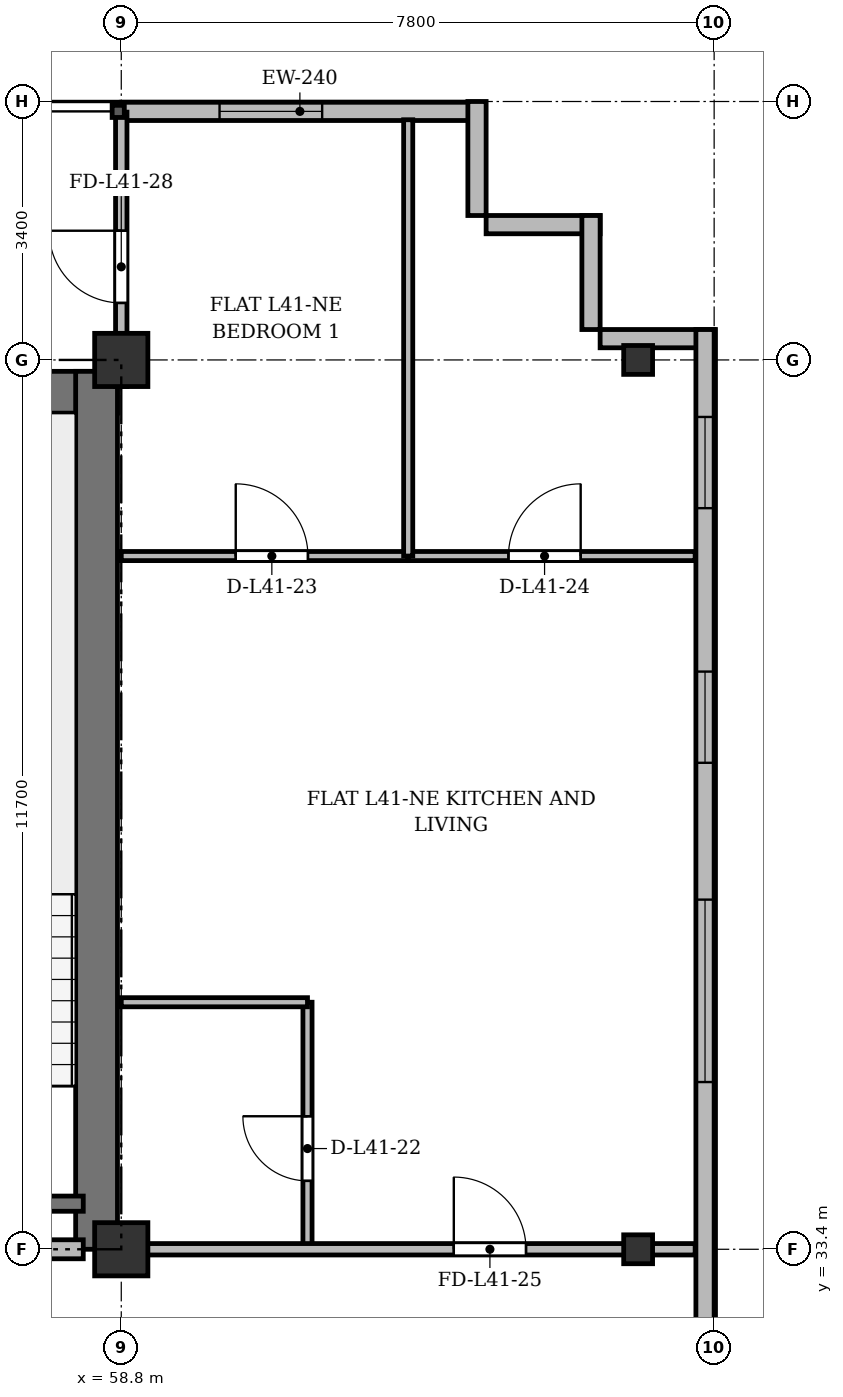
"""IFC4 building model, lengths in metres.
Left out: names, types, materials, properties, quantities, classifications, styles, units other than length and angle.
Written with IfcOpenShell. Run it as: python <this file> out.ifc"""

import sys

from ifc_helpers import new_model, si_unit, direction, frame, frame_2d, origin, origin_2d, place, context, subcontext, project, spatial, rectangle, i_section, extrude, source, transform, mapped, element, fill, save


model = new_model("IFC4")
c1 = context("Model", 3, precision=1e-05, world=origin(), true_north=direction((0.0, 1.0)))
c2 = subcontext(c1, "Body", "Model", "MODEL_VIEW")
j1 = project(units=[si_unit("LENGTHUNIT", "METRE"), si_unit("PLANEANGLEUNIT", "RADIAN")], contexts=[c1])
p1 = place(None, origin())
s1 = spatial("IfcSite", under=j1, at=p1, CompositionType="ELEMENT")
p2 = place(p1, origin())
s2 = spatial("IfcBuilding", under=s1, at=p2, CompositionType="ELEMENT")
p3 = place(p2, frame((0.0, 0.0, 157.3)))
s3 = spatial("IfcBuildingStorey", under=s2, at=p3, CompositionType="ELEMENT", Elevation=157.3)
m1 = source(origin(), c2, "Body", "SweptSolid", [
    extrude(rectangle(XDim=0.7, YDim=0.7, at=origin_2d()), origin(), (0.0, 0.0, 1.0), 3.6),
])
for number, where, z_axis, x_axis in (
    (1, (58.8, 33.4, 0.0), (0.0, 0.0, 1.0), (1.0, 0.0, 0.0)),
    (2, (58.8, 45.1, 0.0), (0.0, 0.0, 1.0), (1.0, 0.0, 0.0)),
):
    element("IfcColumn", number, at=place(p3, frame(where, z_axis=z_axis, x_axis=x_axis)), inside=s3, PredefinedType="COLUMN", context=c2, shape_type="MappedRepresentation", body=[
        mapped(m1, transform((0.0, 0.0, 0.0), x_axis=(1.0, 0.0, 0.0), y_axis=(0.0, 1.0, 0.0), z_axis=(0.0, 0.0, 1.0), scale=1.0)),
    ])
m2 = source(origin(), c2, "Body", "SweptSolid", [
    extrude(i_section(OverallWidth=0.38, OverallDepth=0.38, WebThickness=0.02, FlangeThickness=0.03, at=origin_2d()), origin(), (0.0, 0.0, 1.0), 3.6),
])
for number, where, z_axis, x_axis in (
    (3, (65.6, 33.4, 0.0), (0.0, 0.0, 1.0), (1.0, 0.0, 0.0)),
    (4, (65.6, 45.1, 0.0), (0.0, 0.0, 1.0), (1.0, 0.0, 0.0)),
):
    element("IfcColumn", number, at=place(p3, frame(where, z_axis=z_axis, x_axis=x_axis)), inside=s3, PredefinedType="COLUMN", context=c2, shape_type="MappedRepresentation", body=[
        mapped(m2, transform((0.0, 0.0, 0.0), x_axis=(1.0, 0.0, 0.0), y_axis=(0.0, 1.0, 0.0), z_axis=(0.0, 0.0, 1.0), scale=1.0)),
    ])
p4 = place(p3, frame((58.8, 48.37, 0.0), z_axis=(0.0, 0.0, 1.0), x_axis=(1.0, 0.0, 0.0)))
e5 = element("IfcWall", 5, at=p4, inside=s3, PredefinedType="SOLIDWALL", context=c2, shape_type="SweptSolid", body=[
    extrude(rectangle(XDim=4.7, YDim=0.24, at=frame_2d((2.35, 0.0))), origin(), (0.0, 0.0, 1.0), 3.35),
])
p5 = place(p4, frame((1.293, 0.0, 0.9)))
e6 = element("IfcOpeningElement", 6, at=p5, cuts=e5, PredefinedType="OPENING", context=c2, shape_type="SweptSolid", body=[
    extrude(rectangle(XDim=1.35, YDim=1.5, at=frame_2d((0.675, 0.75))), frame((0.0, 0.13, 0.0), z_axis=(0.0, -1.0, 0.0), x_axis=(1.0, 0.0, 0.0)), (0.0, 0.0, 1.0), 0.26),
])
for number, where, z_axis, x_axis in (
    (7, (63.48, 48.5, 0.0), (0.0, 0.0, 1.0), (0.0, -1.0, 0.0)),
    (8, (63.6, 46.88, 0.0), (0.0, 0.0, 1.0), (1.0, 0.0, 0.0)),
    (9, (64.98, 47.0, 0.0), (0.0, 0.0, 1.0), (0.0, -1.0, 0.0)),
    (10, (65.1, 45.38, 0.0), (0.0, 0.0, 1.0), (1.0, 0.0, 0.0)),
):
    element("IfcWall", number, at=place(p3, frame(where, z_axis=z_axis, x_axis=x_axis)), inside=s3, PredefinedType="SOLIDWALL", context=c2, shape_type="SweptSolid", body=[
        extrude(rectangle(XDim=1.5, YDim=0.24, at=frame_2d((0.75, 0.0))), origin(), (0.0, 0.0, 1.0), 3.35),
    ])
p6 = place(p3, frame((66.48, 45.5, 0.0), z_axis=(0.0, 0.0, 1.0), x_axis=(0.0, -1.0, 0.0)))
e11 = element("IfcWall", 11, at=p6, inside=s3, PredefinedType="SOLIDWALL", context=c2, shape_type="SweptSolid", body=[
    extrude(rectangle(XDim=39.2, YDim=0.24, at=frame_2d((19.6, 0.0))), origin(), (0.0, 0.0, 1.0), 3.35),
])
p7 = place(p6, frame((36.55, 0.0, 0.92)))
e12 = element("IfcOpeningElement", 12, at=p7, cuts=e11, PredefinedType="OPENING", context=c2, shape_type="SweptSolid", body=[
    extrude(rectangle(XDim=1.2, YDim=1.65, at=frame_2d((0.6, 0.825))), frame((0.0, 0.13, 0.0), z_axis=(0.0, -1.0, 0.0), x_axis=(1.0, 0.0, 0.0)), (0.0, 0.0, 1.0), 0.26),
])
p8 = place(p6, frame((32.9, 0.0, 0.92)))
e13 = element("IfcOpeningElement", 13, at=p8, cuts=e11, PredefinedType="OPENING", context=c2, shape_type="SweptSolid", body=[
    extrude(rectangle(XDim=2.4, YDim=2.1, at=frame_2d((1.2, 1.05))), frame((0.0, 0.13, 0.0), z_axis=(0.0, -1.0, 0.0), x_axis=(1.0, 0.0, 0.0)), (0.0, 0.0, 1.0), 0.26),
])
p9 = place(p6, frame((28.7, 0.0, 0.92)))
e14 = element("IfcOpeningElement", 14, at=p9, cuts=e11, PredefinedType="OPENING", context=c2, shape_type="SweptSolid", body=[
    extrude(rectangle(XDim=2.4, YDim=2.1, at=frame_2d((1.2, 1.05))), frame((0.0, 0.13, 0.0), z_axis=(0.0, -1.0, 0.0), x_axis=(1.0, 0.0, 0.0)), (0.0, 0.0, 1.0), 0.26),
])
p10 = place(p6, frame((21.5, 0.0, 0.92)))
e15 = element("IfcOpeningElement", 15, at=p10, cuts=e11, PredefinedType="OPENING", context=c2, shape_type="SweptSolid", body=[
    extrude(rectangle(XDim=2.4, YDim=2.1, at=frame_2d((1.2, 1.05))), frame((0.0, 0.13, 0.0), z_axis=(0.0, -1.0, 0.0), x_axis=(1.0, 0.0, 0.0)), (0.0, 0.0, 1.0), 0.26),
])
p11 = place(p6, frame((7.5, 0.0, 0.92)))
e16 = element("IfcOpeningElement", 16, at=p11, cuts=e11, PredefinedType="OPENING", context=c2, shape_type="SweptSolid", body=[
    extrude(rectangle(XDim=2.4, YDim=2.1, at=frame_2d((1.2, 1.05))), frame((0.0, 0.13, 0.0), z_axis=(0.0, -1.0, 0.0), x_axis=(1.0, 0.0, 0.0)), (0.0, 0.0, 1.0), 0.26),
])
p12 = place(p6, frame((4.5, 0.0, 0.92)))
e17 = element("IfcOpeningElement", 17, at=p12, cuts=e11, PredefinedType="OPENING", context=c2, shape_type="SweptSolid", body=[
    extrude(rectangle(XDim=1.2, YDim=1.65, at=frame_2d((0.6, 0.825))), frame((0.0, 0.13, 0.0), z_axis=(0.0, -1.0, 0.0), x_axis=(1.0, 0.0, 0.0)), (0.0, 0.0, 1.0), 0.26),
])
p13 = place(p6, frame((1.15, 0.0, 0.92)))
e18 = element("IfcOpeningElement", 18, at=p13, cuts=e11, PredefinedType="OPENING", context=c2, shape_type="SweptSolid", body=[
    extrude(rectangle(XDim=1.2, YDim=1.65, at=frame_2d((0.6, 0.825))), frame((0.0, 0.13, 0.0), z_axis=(0.0, -1.0, 0.0), x_axis=(1.0, 0.0, 0.0)), (0.0, 0.0, 1.0), 0.26),
])
p14 = place(p3, frame((15.65, 44.675, 0.0), z_axis=(0.0, 0.0, 1.0), x_axis=(1.0, 0.0, 0.0)))
e19 = element("IfcWall", 19, at=p14, inside=s3, PredefinedType="SHEAR", context=c2, shape_type="SweptSolid", body=[
    extrude(rectangle(XDim=43.1, YDim=0.55, at=frame_2d((21.55, 0.0))), origin(), (0.0, 0.0, 1.0), 3.35),
])
p15 = place(p3, frame((58.475, 33.4, 0.0), z_axis=(0.0, 0.0, 1.0), x_axis=(0.0, 1.0, 0.0)))
e20 = element("IfcWall", 20, at=p15, inside=s3, PredefinedType="SHEAR", context=c2, shape_type="SweptSolid", body=[
    extrude(rectangle(XDim=11.55, YDim=0.55, at=frame_2d((5.775, 0.0))), origin(), (0.0, 0.0, 1.0), 3.35),
])
p16 = place(p3, frame((54.9, 34.0, 0.0), z_axis=(0.0, 0.0, 1.0), x_axis=(1.0, 0.0, 0.0)))
e21 = element("IfcWall", 21, at=p16, inside=s3, PredefinedType="SHEAR", context=c2, shape_type="SweptSolid", body=[
    extrude(rectangle(XDim=3.4, YDim=0.2, at=frame_2d((1.7, 0.0))), origin(), (0.0, 0.0, 1.0), 3.35),
])
p17 = place(p3, frame((47.15, 33.4, 0.0), z_axis=(0.0, 0.0, 1.0), x_axis=(1.0, 0.0, 0.0)))
e22 = element("IfcWall", 22, at=p17, inside=s3, PredefinedType="PARTITIONING", context=c2, shape_type="SweptSolid", body=[
    extrude(rectangle(XDim=11.15, YDim=0.25, at=frame_2d((5.575, 0.0))), origin(), (0.0, 0.0, 1.0), 2.75),
])
p18 = place(p17, frame((0.7, 0.0, 0.0)))
e23 = element("IfcOpeningElement", 23, at=p18, cuts=e22, PredefinedType="OPENING", context=c2, shape_type="SweptSolid", body=[
    extrude(rectangle(XDim=0.95, YDim=2.15, at=frame_2d((0.475, 1.075))), frame((0.0, 0.135, 0.0), z_axis=(0.0, -1.0, 0.0), x_axis=(1.0, 0.0, 0.0)), (0.0, 0.0, 1.0), 0.27),
])
p19 = place(p17, frame((6.0, 0.0, 0.0)))
e24 = element("IfcOpeningElement", 24, at=p19, cuts=e22, PredefinedType="OPENING", context=c2, shape_type="SweptSolid", body=[
    extrude(rectangle(XDim=1.2, YDim=2.15, at=frame_2d((0.6, 1.075))), frame((0.0, 0.135, 0.0), z_axis=(0.0, -1.0, 0.0), x_axis=(1.0, 0.0, 0.0)), (0.0, 0.0, 1.0), 0.27),
])
p20 = place(p3, frame((61.25, 33.4, 0.0), z_axis=(0.0, 0.0, 1.0), x_axis=(0.0, 1.0, 0.0)))
e25 = element("IfcWall", 25, at=p20, inside=s3, PredefinedType="PARTITIONING", context=c2, shape_type="SweptSolid", body=[
    extrude(rectangle(XDim=3.25, YDim=0.12, at=frame_2d((1.625, 0.0))), origin(), (0.0, 0.0, 1.0), 2.75),
])
p21 = place(p20, frame((0.9, 0.0, 0.0)))
e26 = element("IfcOpeningElement", 26, at=p21, cuts=e25, PredefinedType="OPENING", context=c2, shape_type="SweptSolid", body=[
    extrude(rectangle(XDim=0.85, YDim=2.1, at=frame_2d((0.425, 1.05))), frame((0.0, 0.07, 0.0), z_axis=(0.0, -1.0, 0.0), x_axis=(1.0, 0.0, 0.0)), (0.0, 0.0, 1.0), 0.14),
])
p22 = place(p3, frame((58.8, 36.65, 0.0), z_axis=(0.0, 0.0, 1.0), x_axis=(1.0, 0.0, 0.0)))
e27 = element("IfcWall", 27, at=p22, inside=s3, PredefinedType="PARTITIONING", context=c2, shape_type="SweptSolid", body=[
    extrude(rectangle(XDim=2.45, YDim=0.12, at=frame_2d((1.225, 0.0))), origin(), (0.0, 0.0, 1.0), 2.85),
])
p23 = place(p3, frame((58.8, 42.52, 0.0), z_axis=(0.0, 0.0, 1.0), x_axis=(1.0, 0.0, 0.0)))
e28 = element("IfcWall", 28, at=p23, inside=s3, PredefinedType="PARTITIONING", context=c2, shape_type="SweptSolid", body=[
    extrude(rectangle(XDim=3.775, YDim=0.12, at=frame_2d((1.887, 0.0))), origin(), (0.0, 0.0, 1.0), 2.85),
])
p24 = place(p23, frame((1.506, 0.0, 0.0)))
e29 = element("IfcOpeningElement", 29, at=p24, cuts=e28, PredefinedType="OPENING", context=c2, shape_type="SweptSolid", body=[
    extrude(rectangle(XDim=0.95, YDim=2.15, at=frame_2d((0.475, 1.075))), frame((0.0, 0.07, 0.0), z_axis=(0.0, -1.0, 0.0), x_axis=(1.0, 0.0, 0.0)), (0.0, 0.0, 1.0), 0.14),
])
p25 = place(p3, frame((62.575, 42.52, 0.0), z_axis=(0.0, 0.0, 1.0), x_axis=(1.0, 0.0, 0.0)))
e30 = element("IfcWall", 30, at=p25, inside=s3, PredefinedType="PARTITIONING", context=c2, shape_type="SweptSolid", body=[
    extrude(rectangle(XDim=3.775, YDim=0.12, at=frame_2d((1.888, 0.0))), origin(), (0.0, 0.0, 1.0), 2.85),
])
p26 = place(p25, frame((1.319, 0.0, 0.0)))
e31 = element("IfcOpeningElement", 31, at=p26, cuts=e30, PredefinedType="OPENING", context=c2, shape_type="SweptSolid", body=[
    extrude(rectangle(XDim=0.95, YDim=2.15, at=frame_2d((0.475, 1.075))), frame((0.0, 0.07, 0.0), z_axis=(0.0, -1.0, 0.0), x_axis=(1.0, 0.0, 0.0)), (0.0, 0.0, 1.0), 0.14),
])
p27 = place(p3, frame((62.575, 42.52, 0.0), z_axis=(0.0, 0.0, 1.0), x_axis=(0.0, 1.0, 0.0)))
e32 = element("IfcWall", 32, at=p27, inside=s3, PredefinedType="PARTITIONING", context=c2, shape_type="SweptSolid", body=[
    extrude(rectangle(XDim=5.74, YDim=0.12, at=frame_2d((2.87, 0.0))), origin(), (0.0, 0.0, 1.0), 2.75),
])
p28 = place(p3, frame((58.8, 33.4, 0.0), z_axis=(0.0, 0.0, 1.0), x_axis=(1.0, 0.0, 0.0)))
e33 = element("IfcWall", 33, at=p28, inside=s3, PredefinedType="PARTITIONING", context=c2, shape_type="SweptSolid", body=[
    extrude(rectangle(XDim=7.55, YDim=0.15, at=frame_2d((3.775, 0.0))), origin(), (0.0, 0.0, 1.0), 2.75),
])
p29 = place(p28, frame((4.375, 0.0, 0.0)))
e34 = element("IfcOpeningElement", 34, at=p29, cuts=e33, PredefinedType="OPENING", context=c2, shape_type="SweptSolid", body=[
    extrude(rectangle(XDim=0.95, YDim=2.15, at=frame_2d((0.475, 1.075))), frame((0.0, 0.085, 0.0), z_axis=(0.0, -1.0, 0.0), x_axis=(1.0, 0.0, 0.0)), (0.0, 0.0, 1.0), 0.17),
])
p30 = place(p3, frame((58.8, 44.75, 0.0), z_axis=(0.0, 0.0, 1.0), x_axis=(0.0, 1.0, 0.0)))
e35 = element("IfcWall", 35, at=p30, inside=s3, PredefinedType="PARTITIONING", context=c2, shape_type="SweptSolid", body=[
    extrude(rectangle(XDim=3.61, YDim=0.15, at=frame_2d((1.805, 0.0))), origin(), (0.0, 0.0, 1.0), 2.85),
])
p31 = place(p30, frame((1.1, 0.0, 0.0)))
e36 = element("IfcOpeningElement", 36, at=p31, cuts=e35, PredefinedType="OPENING", context=c2, shape_type="SweptSolid", body=[
    extrude(rectangle(XDim=0.95, YDim=2.15, at=frame_2d((0.475, 1.075))), frame((0.0, 0.085, 0.0), z_axis=(0.0, -1.0, 0.0), x_axis=(1.0, 0.0, 0.0)), (0.0, 0.0, 1.0), 0.17),
])
m3 = source(origin(), c2, "Body", "SweptSolid", [
    extrude(rectangle(XDim=1.35, YDim=1.5, at=frame_2d((0.675, 0.75))), frame((0.0, 0.03, 0.0), z_axis=(0.0, -1.0, 0.0), x_axis=(1.0, 0.0, 0.0)), (0.0, 0.0, 1.0), 0.06),
])
p32 = place(p5, origin())
e37 = element("IfcWindow", 37, at=p32, inside=s3, PartitioningType="SINGLE_PANEL", PredefinedType="WINDOW", context=c2, shape_type="MappedRepresentation", body=[
    mapped(m3, transform((0.0, 0.0, 0.0), x_axis=(1.0, 0.0, 0.0), y_axis=(0.0, 1.0, 0.0), z_axis=(0.0, 0.0, 1.0), scale=1.0)),
])
fill(e6, e37)
m4 = source(origin(), c2, "Body", "SweptSolid", [
    extrude(rectangle(XDim=2.4, YDim=2.1, at=frame_2d((1.2, 1.05))), frame((0.0, 0.03, 0.0), z_axis=(0.0, -1.0, 0.0), x_axis=(1.0, 0.0, 0.0)), (0.0, 0.0, 1.0), 0.06),
])
p33 = place(p11, origin())
e38 = element("IfcWindow", 38, at=p33, inside=s3, PartitioningType="SINGLE_PANEL", PredefinedType="WINDOW", context=c2, shape_type="MappedRepresentation", body=[
    mapped(m4, transform((0.0, 0.0, 0.0), x_axis=(1.0, 0.0, 0.0), y_axis=(0.0, 1.0, 0.0), z_axis=(0.0, 0.0, 1.0), scale=1.0)),
])
fill(e16, e38)
m5 = source(origin(), c2, "Body", "SweptSolid", [
    extrude(rectangle(XDim=1.2, YDim=1.65, at=frame_2d((0.6, 0.825))), frame((0.0, 0.03, 0.0), z_axis=(0.0, -1.0, 0.0), x_axis=(1.0, 0.0, 0.0)), (0.0, 0.0, 1.0), 0.06),
])
p34 = place(p12, origin())
e39 = element("IfcWindow", 39, at=p34, inside=s3, PartitioningType="SINGLE_PANEL", PredefinedType="WINDOW", context=c2, shape_type="MappedRepresentation", body=[
    mapped(m5, transform((0.0, 0.0, 0.0), x_axis=(1.0, 0.0, 0.0), y_axis=(0.0, 1.0, 0.0), z_axis=(0.0, 0.0, 1.0), scale=1.0)),
])
fill(e17, e39)
p35 = place(p13, origin())
e40 = element("IfcWindow", 40, at=p35, inside=s3, PartitioningType="SINGLE_PANEL", PredefinedType="WINDOW", context=c2, shape_type="MappedRepresentation", body=[
    mapped(m5, transform((0.0, 0.0, 0.0), x_axis=(1.0, 0.0, 0.0), y_axis=(0.0, 1.0, 0.0), z_axis=(0.0, 0.0, 1.0), scale=1.0)),
])
fill(e18, e40)
m6 = source(origin(), c2, "Body", "SweptSolid", [
    extrude(rectangle(XDim=0.85, YDim=2.1, at=frame_2d((0.425, 1.05))), frame((0.0, 0.025, 0.0), z_axis=(0.0, -1.0, 0.0), x_axis=(1.0, 0.0, 0.0)), (0.0, 0.0, 1.0), 0.05),
])
p36 = place(p21, origin())
e41 = element("IfcDoor", 41, at=p36, inside=s3, OperationType="SINGLE_SWING_RIGHT", PredefinedType="DOOR", context=c2, shape_type="MappedRepresentation", body=[
    mapped(m6, transform((0.0, 0.0, 0.0), x_axis=(1.0, 0.0, 0.0), y_axis=(0.0, 1.0, 0.0), z_axis=(0.0, 0.0, 1.0), scale=1.0)),
])
fill(e26, e41)
m7 = source(origin(), c2, "Body", "SweptSolid", [
    extrude(rectangle(XDim=0.95, YDim=2.15, at=frame_2d((0.475, 1.075))), frame((0.0, 0.025, 0.0), z_axis=(0.0, -1.0, 0.0), x_axis=(1.0, 0.0, 0.0)), (0.0, 0.0, 1.0), 0.05),
])
p37 = place(p24, origin())
e42 = element("IfcDoor", 42, at=p37, inside=s3, OperationType="SINGLE_SWING_LEFT", PredefinedType="DOOR", context=c2, shape_type="MappedRepresentation", body=[
    mapped(m7, transform((0.0, 0.0, 0.0), x_axis=(1.0, 0.0, 0.0), y_axis=(0.0, 1.0, 0.0), z_axis=(0.0, 0.0, 1.0), scale=1.0)),
])
fill(e29, e42)
p38 = place(p26, origin())
e43 = element("IfcDoor", 43, at=p38, inside=s3, OperationType="SINGLE_SWING_RIGHT", PredefinedType="DOOR", context=c2, shape_type="MappedRepresentation", body=[
    mapped(m7, transform((0.0, 0.0, 0.0), x_axis=(1.0, 0.0, 0.0), y_axis=(0.0, 1.0, 0.0), z_axis=(0.0, 0.0, 1.0), scale=1.0)),
])
fill(e31, e43)
p39 = place(p29, origin())
e44 = element("IfcDoor", 44, at=p39, inside=s3, OperationType="SINGLE_SWING_LEFT", PredefinedType="DOOR", context=c2, shape_type="MappedRepresentation", body=[
    mapped(m7, transform((0.0, 0.0, 0.0), x_axis=(1.0, 0.0, 0.0), y_axis=(0.0, 1.0, 0.0), z_axis=(0.0, 0.0, 1.0), scale=1.0)),
])
fill(e34, e44)
p40 = place(p31, origin())
e45 = element("IfcDoor", 45, at=p40, inside=s3, OperationType="SINGLE_SWING_RIGHT", PredefinedType="DOOR", context=c2, shape_type="MappedRepresentation", body=[
    mapped(m7, transform((0.0, 0.0, 0.0), x_axis=(1.0, 0.0, 0.0), y_axis=(0.0, 1.0, 0.0), z_axis=(0.0, 0.0, 1.0), scale=1.0)),
])
fill(e36, e45)
save(model, sys.argv[1])
